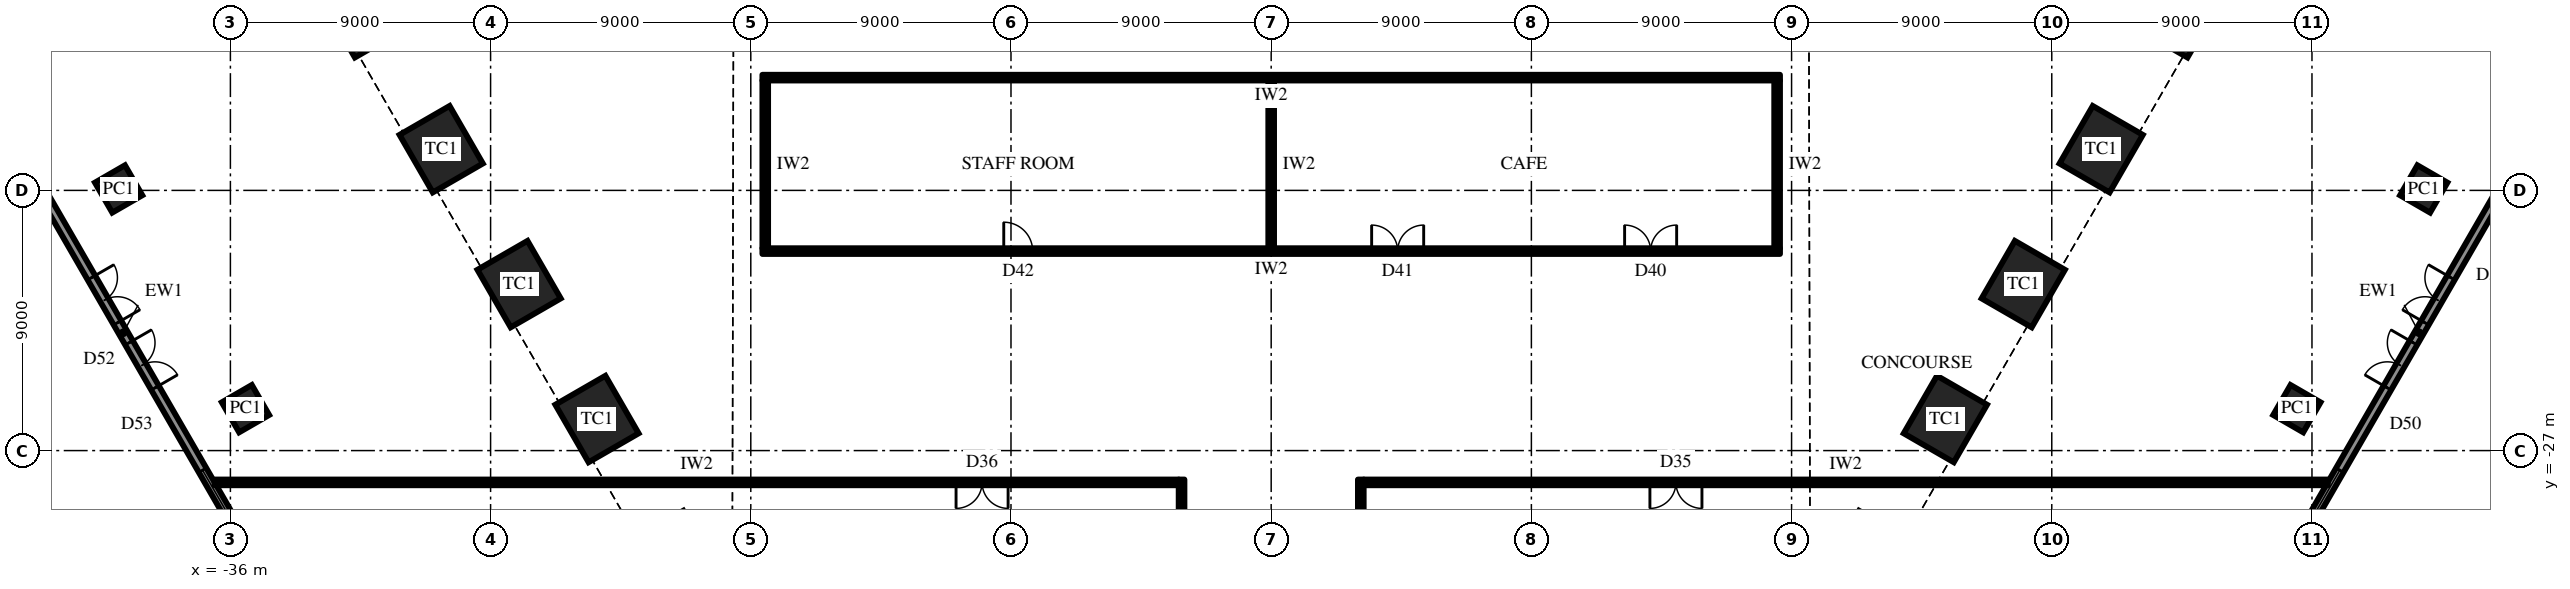
"""IFC4 building model, lengths in metres.
Left out: names, types, materials, properties, quantities, classifications, styles, units other than length and angle.
Written with IfcOpenShell. Run it as: python <this file> out.ifc"""

import sys

from ifc_helpers import new_model, si_unit, direction, frame, frame_2d, origin, origin_2d, place, context, subcontext, project, spatial, rectangle, extrude, element, fill, save


model = new_model("IFC4")
c1 = context("Model", 3, precision=1e-05, world=origin(), true_north=direction((0.0, 1.0)))
c2 = subcontext(c1, "Body", "Model", "MODEL_VIEW")
j1 = project(units=[si_unit("LENGTHUNIT", "METRE"), si_unit("PLANEANGLEUNIT", "RADIAN")], contexts=[c1])
p1 = place(None, origin())
s1 = spatial("IfcSite", under=j1, at=p1, CompositionType="ELEMENT")
p2 = place(p1, origin())
s2 = spatial("IfcBuilding", under=s1, at=p2, CompositionType="ELEMENT")
p3 = place(p2, origin())
s3 = spatial("IfcBuildingStorey", under=s2, at=p3, CompositionType="ELEMENT", Elevation=0.0)
for number, where, z_axis, x_axis in (
    (1, (-31.403, -11.908, 0.0), (0.0, 0.0, 1.0), (0.5, -0.866, 0.0)),
    (2, (-28.709, -16.575, 0.0), (0.0, 0.0, 1.0), (0.5, -0.866, 0.0)),
    (3, (-26.014, -21.242, 0.0), (0.0, 0.0, 1.0), (0.5, -0.866, 0.0)),
    (4, (-23.32, -25.908, 0.0), (0.0, 0.0, 1.0), (0.5, -0.866, 0.0)),
    (5, (23.32, -25.908, 0.0), (0.0, 0.0, 1.0), (0.5, 0.866, 0.0)),
    (6, (26.014, -21.242, 0.0), (0.0, 0.0, 1.0), (0.5, 0.866, 0.0)),
    (7, (28.709, -16.575, 0.0), (0.0, 0.0, 1.0), (0.5, 0.866, 0.0)),
    (8, (31.403, -11.908, 0.0), (0.0, 0.0, 1.0), (0.5, 0.866, 0.0)),
):
    element("IfcColumn", number, at=place(p3, frame(where, z_axis=z_axis, x_axis=x_axis)), inside=s3, PredefinedType="COLUMN", context=c2, shape_type="SweptSolid", body=[
        extrude(rectangle(XDim=2.3, YDim=2.0, at=origin_2d()), origin(), (0.0, 0.0, 1.0), 7.0),
    ])
for number, where, z_axis, x_axis in (
    (9, (-39.866, -17.95, 0.0), (0.0, 0.0, 1.0), (0.5, -0.866, 0.0)),
    (10, (-35.478, -25.55, 0.0), (0.0, 0.0, 1.0), (0.5, -0.866, 0.0)),
    (11, (35.478, -25.55, 0.0), (0.0, 0.0, 1.0), (0.5, 0.866, 0.0)),
    (12, (39.866, -17.95, 0.0), (0.0, 0.0, 1.0), (0.5, 0.866, 0.0)),
):
    element("IfcColumn", number, at=place(p3, frame(where, z_axis=z_axis, x_axis=x_axis)), inside=s3, PredefinedType="COLUMN", context=c2, shape_type="SweptSolid", body=[
        extrude(rectangle(XDim=1.2, YDim=1.2, at=origin_2d()), origin(), (0.0, 0.0, 1.0), 7.0),
    ])
p4 = place(p3, frame((-50.677, -3.925, 0.0), z_axis=(0.0, 0.0, 1.0), x_axis=(0.500002442456, -0.866023993627, 0.0)))
e13 = element("IfcWall", 13, at=p4, inside=s3, PredefinedType="SOLIDWALL", context=c2, shape_type="SweptSolid", body=[
    extrude(rectangle(XDim=43.879, YDim=0.3, at=frame_2d((21.939, 0.0))), origin(), (0.0, 0.0, 1.0), 6.65),
])
p5 = place(p4, frame((1.1, 0.0, 0.3)))
e14 = element("IfcOpeningElement", 14, at=p5, cuts=e13, PredefinedType="OPENING", context=c2, shape_type="SweptSolid", body=[
    extrude(rectangle(XDim=6.576, YDim=5.0, at=frame_2d((3.288, 2.5))), frame((0.0, 0.16, 0.0), z_axis=(0.0, -1.0, 0.0), x_axis=(1.0, 0.0, 0.0)), (0.0, 0.0, 1.0), 0.32),
])
p6 = place(p4, frame((9.875, 0.0, 0.3)))
e15 = element("IfcOpeningElement", 15, at=p6, cuts=e13, PredefinedType="OPENING", context=c2, shape_type="SweptSolid", body=[
    extrude(rectangle(XDim=6.576, YDim=5.0, at=frame_2d((3.288, 2.5))), frame((0.0, 0.16, 0.0), z_axis=(0.0, -1.0, 0.0), x_axis=(1.0, 0.0, 0.0)), (0.0, 0.0, 1.0), 0.32),
])
p7 = place(p4, frame((19.739, 0.0, 0.0)))
e16 = element("IfcOpeningElement", 16, at=p7, cuts=e13, PredefinedType="OPENING", context=c2, shape_type="SweptSolid", body=[
    extrude(rectangle(XDim=1.8, YDim=2.7, at=frame_2d((0.9, 1.35))), frame((0.0, 0.16, 0.0), z_axis=(0.0, -1.0, 0.0), x_axis=(1.0, 0.0, 0.0)), (0.0, 0.0, 1.0), 0.32),
])
p8 = place(p4, frame((22.339, 0.0, 0.0)))
e17 = element("IfcOpeningElement", 17, at=p8, cuts=e13, PredefinedType="OPENING", context=c2, shape_type="SweptSolid", body=[
    extrude(rectangle(XDim=1.8, YDim=2.7, at=frame_2d((0.9, 1.35))), frame((0.0, 0.16, 0.0), z_axis=(0.0, -1.0, 0.0), x_axis=(1.0, 0.0, 0.0)), (0.0, 0.0, 1.0), 0.32),
])
p9 = place(p4, frame((27.427, 0.0, 0.3)))
e18 = element("IfcOpeningElement", 18, at=p9, cuts=e13, PredefinedType="OPENING", context=c2, shape_type="SweptSolid", body=[
    extrude(rectangle(XDim=6.576, YDim=5.0, at=frame_2d((3.288, 2.5))), frame((0.0, 0.16, 0.0), z_axis=(0.0, -1.0, 0.0), x_axis=(1.0, 0.0, 0.0)), (0.0, 0.0, 1.0), 0.32),
])
p10 = place(p4, frame((36.203, 0.0, 0.3)))
e19 = element("IfcOpeningElement", 19, at=p10, cuts=e13, PredefinedType="OPENING", context=c2, shape_type="SweptSolid", body=[
    extrude(rectangle(XDim=6.576, YDim=5.0, at=frame_2d((3.288, 2.5))), frame((0.0, 0.16, 0.0), z_axis=(0.0, -1.0, 0.0), x_axis=(1.0, 0.0, 0.0)), (0.0, 0.0, 1.0), 0.32),
])
p11 = place(p3, frame((28.738, -41.925, 0.0), z_axis=(0.0, 0.0, 1.0), x_axis=(0.500002442456, 0.866023993627, 0.0)))
e20 = element("IfcWall", 20, at=p11, inside=s3, PredefinedType="SOLIDWALL", context=c2, shape_type="SweptSolid", body=[
    extrude(rectangle(XDim=43.879, YDim=0.3, at=frame_2d((21.939, 0.0))), origin(), (0.0, 0.0, 1.0), 6.65),
])
p12 = place(p11, frame((1.1, 0.0, 0.3)))
e21 = element("IfcOpeningElement", 21, at=p12, cuts=e20, PredefinedType="OPENING", context=c2, shape_type="SweptSolid", body=[
    extrude(rectangle(XDim=6.576, YDim=5.0, at=frame_2d((3.288, 2.5))), frame((0.0, 0.16, 0.0), z_axis=(0.0, -1.0, 0.0), x_axis=(1.0, 0.0, 0.0)), (0.0, 0.0, 1.0), 0.32),
])
p13 = place(p11, frame((9.875, 0.0, 0.3)))
e22 = element("IfcOpeningElement", 22, at=p13, cuts=e20, PredefinedType="OPENING", context=c2, shape_type="SweptSolid", body=[
    extrude(rectangle(XDim=6.576, YDim=5.0, at=frame_2d((3.288, 2.5))), frame((0.0, 0.16, 0.0), z_axis=(0.0, -1.0, 0.0), x_axis=(1.0, 0.0, 0.0)), (0.0, 0.0, 1.0), 0.32),
])
p14 = place(p11, frame((19.739, 0.0, 0.0)))
e23 = element("IfcOpeningElement", 23, at=p14, cuts=e20, PredefinedType="OPENING", context=c2, shape_type="SweptSolid", body=[
    extrude(rectangle(XDim=1.8, YDim=2.7, at=frame_2d((0.9, 1.35))), frame((0.0, 0.16, 0.0), z_axis=(0.0, -1.0, 0.0), x_axis=(1.0, 0.0, 0.0)), (0.0, 0.0, 1.0), 0.32),
])
p15 = place(p11, frame((22.339, 0.0, 0.0)))
e24 = element("IfcOpeningElement", 24, at=p15, cuts=e20, PredefinedType="OPENING", context=c2, shape_type="SweptSolid", body=[
    extrude(rectangle(XDim=1.8, YDim=2.7, at=frame_2d((0.9, 1.35))), frame((0.0, 0.16, 0.0), z_axis=(0.0, -1.0, 0.0), x_axis=(1.0, 0.0, 0.0)), (0.0, 0.0, 1.0), 0.32),
])
p16 = place(p11, frame((27.427, 0.0, 0.3)))
e25 = element("IfcOpeningElement", 25, at=p16, cuts=e20, PredefinedType="OPENING", context=c2, shape_type="SweptSolid", body=[
    extrude(rectangle(XDim=6.576, YDim=5.0, at=frame_2d((3.288, 2.5))), frame((0.0, 0.16, 0.0), z_axis=(0.0, -1.0, 0.0), x_axis=(1.0, 0.0, 0.0)), (0.0, 0.0, 1.0), 0.32),
])
p17 = place(p11, frame((36.203, 0.0, 0.3)))
e26 = element("IfcOpeningElement", 26, at=p17, cuts=e20, PredefinedType="OPENING", context=c2, shape_type="SweptSolid", body=[
    extrude(rectangle(XDim=6.576, YDim=5.0, at=frame_2d((3.288, 2.5))), frame((0.0, 0.16, 0.0), z_axis=(0.0, -1.0, 0.0), x_axis=(1.0, 0.0, 0.0)), (0.0, 0.0, 1.0), 0.32),
])
p18 = place(p3, frame((17.6, -14.1, 0.0), z_axis=(0.0, 0.0, 1.0), x_axis=(-1.0, 0.0, 0.0)))
e27 = element("IfcWall", 27, at=p18, inside=s3, PredefinedType="PARTITIONING", context=c2, shape_type="SweptSolid", body=[
    extrude(rectangle(XDim=35.2, YDim=0.2, at=frame_2d((17.6, 0.0))), origin(), (0.0, 0.0, 1.0), 6.65),
])
p19 = place(p3, frame((17.5, -14.2, 0.0), z_axis=(0.0, 0.0, 1.0), x_axis=(0.0, -1.0, 0.0)))
e28 = element("IfcWall", 28, at=p19, inside=s3, PredefinedType="PARTITIONING", context=c2, shape_type="SweptSolid", body=[
    extrude(rectangle(XDim=5.8, YDim=0.2, at=frame_2d((2.9, 0.0))), origin(), (0.0, 0.0, 1.0), 6.65),
])
p20 = place(p3, frame((0.0, -14.2, 0.0), z_axis=(0.0, 0.0, 1.0), x_axis=(0.0, -1.0, 0.0)))
e29 = element("IfcWall", 29, at=p20, inside=s3, PredefinedType="PARTITIONING", context=c2, shape_type="SweptSolid", body=[
    extrude(rectangle(XDim=5.8, YDim=0.2, at=frame_2d((2.9, 0.0))), origin(), (0.0, 0.0, 1.0), 5.594),
])
p21 = place(p3, frame((-17.5, -14.2, 0.0), z_axis=(0.0, 0.0, 1.0), x_axis=(0.0, -1.0, 0.0)))
e30 = element("IfcWall", 30, at=p21, inside=s3, PredefinedType="PARTITIONING", context=c2, shape_type="SweptSolid", body=[
    extrude(rectangle(XDim=5.8, YDim=0.2, at=frame_2d((2.9, 0.0))), origin(), (0.0, 0.0, 1.0), 6.65),
])
p22 = place(p3, frame((17.6, -20.1, 0.0), z_axis=(0.0, 0.0, 1.0), x_axis=(-1.0, 0.0, 0.0)))
e31 = element("IfcWall", 31, at=p22, inside=s3, PredefinedType="PARTITIONING", context=c2, shape_type="SweptSolid", body=[
    extrude(rectangle(XDim=35.2, YDim=0.2, at=frame_2d((17.6, 0.0))), origin(), (0.0, 0.0, 1.0), 6.65),
])
p23 = place(p22, frame((3.575, 0.0, 0.0)))
e32 = element("IfcOpeningElement", 32, at=p23, cuts=e31, PredefinedType="OPENING", context=c2, shape_type="SweptSolid", body=[
    extrude(rectangle(XDim=1.8, YDim=2.4, at=frame_2d((0.9, 1.2))), frame((0.0, 0.11, 0.0), z_axis=(0.0, -1.0, 0.0), x_axis=(1.0, 0.0, 0.0)), (0.0, 0.0, 1.0), 0.22),
])
p24 = place(p22, frame((12.325, 0.0, 0.0)))
e33 = element("IfcOpeningElement", 33, at=p24, cuts=e31, PredefinedType="OPENING", context=c2, shape_type="SweptSolid", body=[
    extrude(rectangle(XDim=1.8, YDim=2.4, at=frame_2d((0.9, 1.2))), frame((0.0, 0.11, 0.0), z_axis=(0.0, -1.0, 0.0), x_axis=(1.0, 0.0, 0.0)), (0.0, 0.0, 1.0), 0.22),
])
p25 = place(p22, frame((25.85, 0.0, 0.0)))
e34 = element("IfcOpeningElement", 34, at=p25, cuts=e31, PredefinedType="OPENING", context=c2, shape_type="SweptSolid", body=[
    extrude(rectangle(XDim=1.0, YDim=2.2, at=frame_2d((0.5, 1.1))), frame((0.0, 0.11, 0.0), z_axis=(0.0, -1.0, 0.0), x_axis=(1.0, 0.0, 0.0)), (0.0, 0.0, 1.0), 0.22),
])
p26 = place(p3, frame((-36.546, -28.1, 0.0), z_axis=(0.0, 0.0, 1.0), x_axis=(1.0, 0.0, 0.0)))
e35 = element("IfcWall", 35, at=p26, inside=s3, PredefinedType="PARTITIONING", context=c2, shape_type="SweptSolid", body=[
    extrude(rectangle(XDim=33.346, YDim=0.2, at=frame_2d((16.673, 0.0))), origin(), (0.0, 0.0, 1.0), 6.65),
])
p27 = place(p26, frame((25.646, 0.0, 0.0)))
e36 = element("IfcOpeningElement", 36, at=p27, cuts=e35, PredefinedType="OPENING", context=c2, shape_type="SweptSolid", body=[
    extrude(rectangle(XDim=1.8, YDim=2.4, at=frame_2d((0.9, 1.2))), frame((0.0, 0.11, 0.0), z_axis=(0.0, -1.0, 0.0), x_axis=(1.0, 0.0, 0.0)), (0.0, 0.0, 1.0), 0.22),
])
p28 = place(p3, frame((3.2, -28.1, 0.0), z_axis=(0.0, 0.0, 1.0), x_axis=(1.0, 0.0, 0.0)))
e37 = element("IfcWall", 37, at=p28, inside=s3, PredefinedType="PARTITIONING", context=c2, shape_type="SweptSolid", body=[
    extrude(rectangle(XDim=33.346, YDim=0.2, at=frame_2d((16.673, 0.0))), origin(), (0.0, 0.0, 1.0), 6.65),
])
p29 = place(p28, frame((9.9, 0.0, 0.0)))
e38 = element("IfcOpeningElement", 38, at=p29, cuts=e37, PredefinedType="OPENING", context=c2, shape_type="SweptSolid", body=[
    extrude(rectangle(XDim=1.8, YDim=2.4, at=frame_2d((0.9, 1.2))), frame((0.0, 0.11, 0.0), z_axis=(0.0, -1.0, 0.0), x_axis=(1.0, 0.0, 0.0)), (0.0, 0.0, 1.0), 0.22),
])
for number, where, z_axis, x_axis in (
    (39, (-3.1, -34.4, 0.0), (0.0, 0.0, 1.0), (0.0, 1.0, 0.0)),
    (40, (3.1, -34.4, 0.0), (0.0, 0.0, 1.0), (0.0, 1.0, 0.0)),
):
    element("IfcWall", number, at=place(p3, frame(where, z_axis=z_axis, x_axis=x_axis)), inside=s3, PredefinedType="PARTITIONING", context=c2, shape_type="SweptSolid", body=[
        extrude(rectangle(XDim=6.4, YDim=0.2, at=frame_2d((3.2, 0.0))), origin(), (0.0, 0.0, 1.0), 6.65),
    ])
p30 = place(p7, origin())
e41 = element("IfcDoor", 41, at=p30, inside=s3, OperationType="DOUBLE_DOOR_SINGLE_SWING", PredefinedType="DOOR", context=c2, shape_type="SweptSolid", body=[
    extrude(rectangle(XDim=1.8, YDim=2.7, at=frame_2d((0.9, 1.35))), frame((0.0, 0.025, 0.0), z_axis=(0.0, -1.0, 0.0), x_axis=(1.0, 0.0, 0.0)), (0.0, 0.0, 1.0), 0.05),
])
fill(e16, e41)
p31 = place(p8, origin())
e42 = element("IfcDoor", 42, at=p31, inside=s3, OperationType="DOUBLE_DOOR_SINGLE_SWING", PredefinedType="DOOR", context=c2, shape_type="SweptSolid", body=[
    extrude(rectangle(XDim=1.8, YDim=2.7, at=frame_2d((0.9, 1.35))), frame((0.0, 0.025, 0.0), z_axis=(0.0, -1.0, 0.0), x_axis=(1.0, 0.0, 0.0)), (0.0, 0.0, 1.0), 0.05),
])
fill(e17, e42)
p32 = place(p9, origin())
e43 = element("IfcWindow", 43, at=p32, inside=s3, PartitioningType="SINGLE_PANEL", PredefinedType="WINDOW", context=c2, shape_type="SweptSolid", body=[
    extrude(rectangle(XDim=6.576, YDim=5.0, at=frame_2d((3.288, 2.5))), frame((0.0, 0.03, 0.0), z_axis=(0.0, -1.0, 0.0), x_axis=(1.0, 0.0, 0.0)), (0.0, 0.0, 1.0), 0.06),
])
fill(e18, e43)
p33 = place(p13, origin())
e44 = element("IfcWindow", 44, at=p33, inside=s3, PartitioningType="SINGLE_PANEL", PredefinedType="WINDOW", context=c2, shape_type="SweptSolid", body=[
    extrude(rectangle(XDim=6.576, YDim=5.0, at=frame_2d((3.288, 2.5))), frame((0.0, 0.03, 0.0), z_axis=(0.0, -1.0, 0.0), x_axis=(1.0, 0.0, 0.0)), (0.0, 0.0, 1.0), 0.06),
])
fill(e22, e44)
p34 = place(p14, origin())
e45 = element("IfcDoor", 45, at=p34, inside=s3, OperationType="DOUBLE_DOOR_SINGLE_SWING", PredefinedType="DOOR", context=c2, shape_type="SweptSolid", body=[
    extrude(rectangle(XDim=1.8, YDim=2.7, at=frame_2d((0.9, 1.35))), frame((0.0, 0.025, 0.0), z_axis=(0.0, -1.0, 0.0), x_axis=(1.0, 0.0, 0.0)), (0.0, 0.0, 1.0), 0.05),
])
fill(e23, e45)
p35 = place(p15, origin())
e46 = element("IfcDoor", 46, at=p35, inside=s3, OperationType="DOUBLE_DOOR_SINGLE_SWING", PredefinedType="DOOR", context=c2, shape_type="SweptSolid", body=[
    extrude(rectangle(XDim=1.8, YDim=2.7, at=frame_2d((0.9, 1.35))), frame((0.0, 0.025, 0.0), z_axis=(0.0, -1.0, 0.0), x_axis=(1.0, 0.0, 0.0)), (0.0, 0.0, 1.0), 0.05),
])
fill(e24, e46)
p36 = place(p23, frame((1.8, 0.0, 0.0), z_axis=(0.0, 0.0, 1.0), x_axis=(-1.0, 0.0, 0.0)))
e47 = element("IfcDoor", 47, at=p36, inside=s3, OperationType="DOUBLE_DOOR_SINGLE_SWING", PredefinedType="DOOR", context=c2, shape_type="SweptSolid", body=[
    extrude(rectangle(XDim=1.8, YDim=2.4, at=frame_2d((0.9, 1.2))), frame((0.0, 0.025, 0.0), z_axis=(0.0, -1.0, 0.0), x_axis=(1.0, 0.0, 0.0)), (0.0, 0.0, 1.0), 0.05),
])
fill(e32, e47)
p37 = place(p24, frame((1.8, 0.0, 0.0), z_axis=(0.0, 0.0, 1.0), x_axis=(-1.0, 0.0, 0.0)))
e48 = element("IfcDoor", 48, at=p37, inside=s3, OperationType="DOUBLE_DOOR_SINGLE_SWING", PredefinedType="DOOR", context=c2, shape_type="SweptSolid", body=[
    extrude(rectangle(XDim=1.8, YDim=2.4, at=frame_2d((0.9, 1.2))), frame((0.0, 0.025, 0.0), z_axis=(0.0, -1.0, 0.0), x_axis=(1.0, 0.0, 0.0)), (0.0, 0.0, 1.0), 0.05),
])
fill(e33, e48)
p38 = place(p25, frame((1.0, 0.0, 0.0), z_axis=(0.0, 0.0, 1.0), x_axis=(-1.0, 0.0, 0.0)))
e49 = element("IfcDoor", 49, at=p38, inside=s3, OperationType="SINGLE_SWING_RIGHT", PredefinedType="DOOR", context=c2, shape_type="SweptSolid", body=[
    extrude(rectangle(XDim=1.0, YDim=2.2, at=frame_2d((0.5, 1.1))), frame((0.0, 0.025, 0.0), z_axis=(0.0, -1.0, 0.0), x_axis=(1.0, 0.0, 0.0)), (0.0, 0.0, 1.0), 0.05),
])
fill(e34, e49)
p39 = place(p27, frame((1.8, 0.0, 0.0), z_axis=(0.0, 0.0, 1.0), x_axis=(-1.0, 0.0, 0.0)))
e50 = element("IfcDoor", 50, at=p39, inside=s3, OperationType="DOUBLE_DOOR_SINGLE_SWING", PredefinedType="DOOR", context=c2, shape_type="SweptSolid", body=[
    extrude(rectangle(XDim=1.8, YDim=2.4, at=frame_2d((0.9, 1.2))), frame((0.0, 0.025, 0.0), z_axis=(0.0, -1.0, 0.0), x_axis=(1.0, 0.0, 0.0)), (0.0, 0.0, 1.0), 0.05),
])
fill(e36, e50)
p40 = place(p29, frame((1.8, 0.0, 0.0), z_axis=(0.0, 0.0, 1.0), x_axis=(-1.0, 0.0, 0.0)))
e51 = element("IfcDoor", 51, at=p40, inside=s3, OperationType="DOUBLE_DOOR_SINGLE_SWING", PredefinedType="DOOR", context=c2, shape_type="SweptSolid", body=[
    extrude(rectangle(XDim=1.8, YDim=2.4, at=frame_2d((0.9, 1.2))), frame((0.0, 0.025, 0.0), z_axis=(0.0, -1.0, 0.0), x_axis=(1.0, 0.0, 0.0)), (0.0, 0.0, 1.0), 0.05),
])
fill(e38, e51)
save(model, sys.argv[1])
